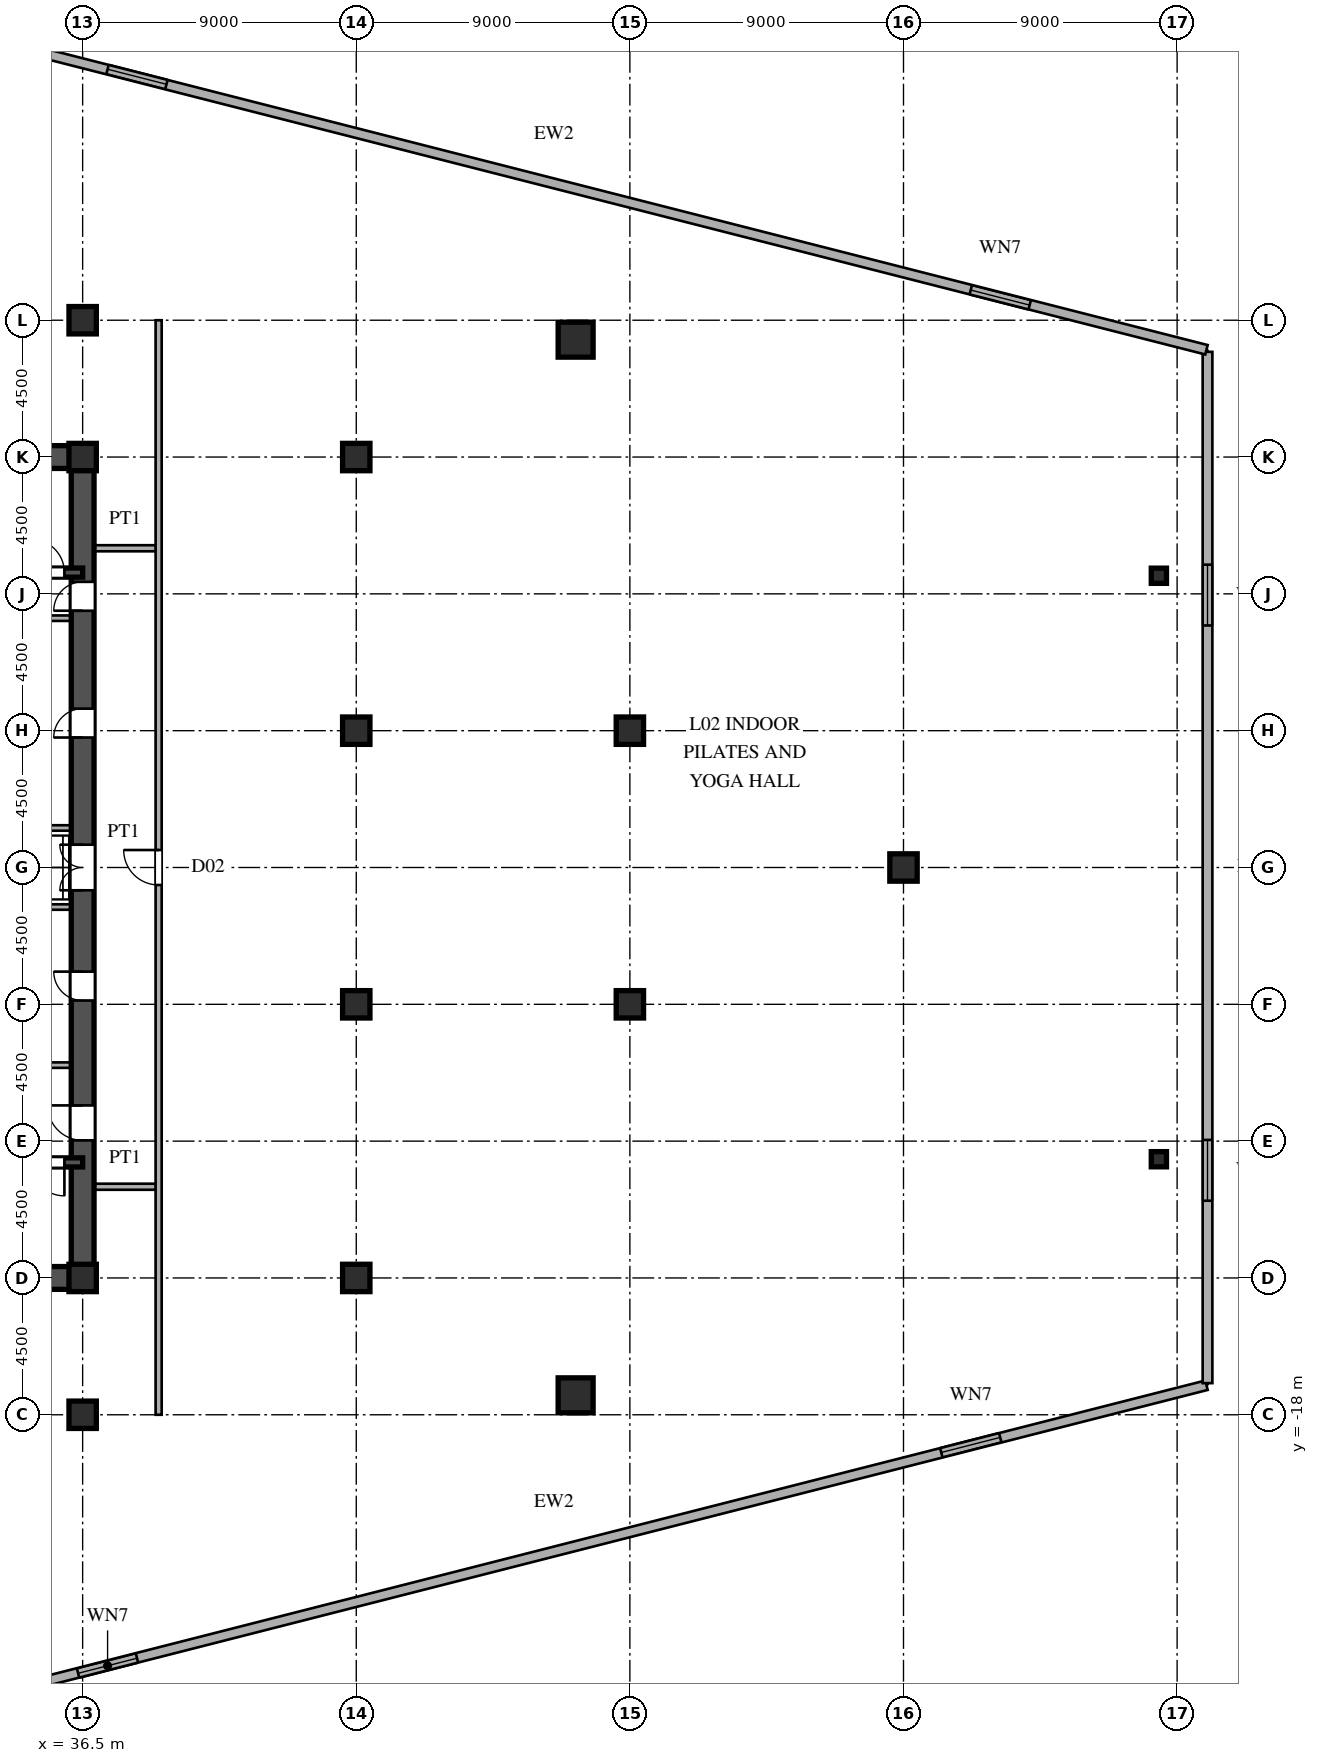
"""IFC4 building model, lengths in metres.
Left out: names, types, materials, properties, quantities, classifications, styles, units other than length and angle.
Written with IfcOpenShell. Run it as: python <this file> out.ifc"""

import sys

from ifc_helpers import new_model, si_unit, direction, frame, frame_2d, origin, origin_2d, place, context, subcontext, project, spatial, rectangle, hollow_rectangle, i_section, extrude, source, transform, mapped, element, fill, save


model = new_model("IFC4")
c1 = context("Model", 3, precision=1e-05, world=origin(), true_north=direction((0.0, 1.0)))
c2 = subcontext(c1, "Body", "Model", "MODEL_VIEW")
j1 = project(units=[si_unit("LENGTHUNIT", "METRE"), si_unit("PLANEANGLEUNIT", "RADIAN")], contexts=[c1])
p1 = place(None, origin())
s1 = spatial("IfcSite", under=j1, at=p1, CompositionType="ELEMENT")
p2 = place(p1, origin())
s2 = spatial("IfcBuilding", under=s1, at=p2, CompositionType="ELEMENT")
p3 = place(p2, frame((0.0, 0.0, 9.9)))
s3 = spatial("IfcBuildingStorey", under=s2, at=p3, CompositionType="ELEMENT", Elevation=9.9)
m1 = source(origin(), c2, "Body", "SweptSolid", [
    extrude(i_section(OverallWidth=0.9, OverallDepth=0.9, WebThickness=0.036, FlangeThickness=0.055, at=origin_2d()), origin(), (0.0, 0.0, 1.0), 4.5),
])
for number, where, z_axis, x_axis in (
    (1, (36.5, -18.0, 0.0), (0.0, 0.0, 1.0), (1.0, 0.0, 0.0)),
    (2, (36.5, -13.5, 0.0), (0.0, 0.0, 1.0), (1.0, 0.0, 0.0)),
    (3, (36.5, 13.5, 0.0), (0.0, 0.0, 1.0), (1.0, 0.0, 0.0)),
    (4, (36.5, 18.0, 0.0), (0.0, 0.0, 1.0), (1.0, 0.0, 0.0)),
    (5, (45.5, -13.5, 0.0), (0.0, 0.0, 1.0), (1.0, 0.0, 0.0)),
    (6, (45.5, -4.5, 0.0), (0.0, 0.0, 1.0), (1.0, 0.0, 0.0)),
    (7, (45.5, 4.5, 0.0), (0.0, 0.0, 1.0), (1.0, 0.0, 0.0)),
    (8, (45.5, 13.5, 0.0), (0.0, 0.0, 1.0), (1.0, 0.0, 0.0)),
    (9, (54.5, -4.5, 0.0), (0.0, 0.0, 1.0), (1.0, 0.0, 0.0)),
    (10, (54.5, 4.5, 0.0), (0.0, 0.0, 1.0), (1.0, 0.0, 0.0)),
    (11, (63.5, 0.0, 0.0), (0.0, 0.0, 1.0), (1.0, 0.0, 0.0)),
):
    element("IfcColumn", number, at=place(p3, frame(where, z_axis=z_axis, x_axis=x_axis)), inside=s3, PredefinedType="COLUMN", context=c2, shape_type="MappedRepresentation", body=[
        mapped(m1, transform((0.0, 0.0, 0.0), scale=1.0)),
    ])
m2 = source(origin(), c2, "Body", "SweptSolid", [
    extrude(hollow_rectangle(XDim=0.5, YDim=0.5, WallThickness=0.02, at=origin_2d()), origin(), (0.0, 0.0, 1.0), 4.5),
])
for number, where, z_axis, x_axis in (
    (12, (71.9, -9.596, 0.0), (0.0, 0.0, 1.0), (1.0, 0.0, 0.0)),
    (13, (71.9, 9.596, 0.0), (0.0, 0.0, 1.0), (1.0, 0.0, 0.0)),
):
    element("IfcColumn", number, at=place(p3, frame(where, z_axis=z_axis, x_axis=x_axis)), inside=s3, PredefinedType="COLUMN", context=c2, shape_type="MappedRepresentation", body=[
        mapped(m2, transform((0.0, 0.0, 0.0), scale=1.0)),
    ])
m3 = source(origin(), c2, "Body", "SweptSolid", [
    extrude(hollow_rectangle(XDim=1.15, YDim=1.15, WallThickness=0.048, at=origin_2d()), origin(), (0.0, 0.0, 1.0), 4.5),
])
for number, where, z_axis, x_axis in (
    (14, (52.716, -17.361, 0.0), (0.0, 0.0, 1.0), (1.0, 0.0, 0.0)),
    (15, (52.716, 17.361, 0.0), (0.0, 0.0, 1.0), (1.0, 0.0, 0.0)),
):
    element("IfcColumn", number, at=place(p3, frame(where, z_axis=z_axis, x_axis=x_axis)), inside=s3, PredefinedType="COLUMN", context=c2, shape_type="MappedRepresentation", body=[
        mapped(m3, transform((0.0, 0.0, 0.0), scale=1.0)),
    ])
p4 = place(p3, frame((30.539, -27.99, 0.0), z_axis=(0.0, 0.0, 1.0), x_axis=(0.968803566014, 0.247829882134, 0.0)))
e16 = element("IfcWall", 16, at=p4, inside=s3, PredefinedType="SOLIDWALL", context=c2, shape_type="SweptSolid", body=[
    extrude(rectangle(XDim=44.304, YDim=0.32, at=frame_2d((22.152, 0.0))), origin(), (0.0, 0.0, 1.0), 4.22),
])
p5 = place(p4, frame((6.0, 0.0, 0.85)))
e17 = element("IfcOpeningElement", 17, at=p5, cuts=e16, PredefinedType="OPENING", context=c2, shape_type="SweptSolid", body=[
    extrude(rectangle(XDim=2.0, YDim=1.95, at=frame_2d((1.0, 0.975))), frame((0.0, 0.17, 0.0), z_axis=(0.0, -1.0, 0.0), x_axis=(1.0, 0.0, 0.0)), (0.0, 0.0, 1.0), 0.34),
])
p6 = place(p4, frame((35.305, 0.0, 0.85)))
e18 = element("IfcOpeningElement", 18, at=p6, cuts=e16, PredefinedType="OPENING", context=c2, shape_type="SweptSolid", body=[
    extrude(rectangle(XDim=2.0, YDim=1.95, at=frame_2d((1.0, 0.975))), frame((0.0, 0.17, 0.0), z_axis=(0.0, -1.0, 0.0), x_axis=(1.0, 0.0, 0.0)), (0.0, 0.0, 1.0), 0.34),
])
p7 = place(p3, frame((73.5, -16.96, 0.0), z_axis=(0.0, 0.0, 1.0), x_axis=(0.0, 1.0, 0.0)))
e19 = element("IfcWall", 19, at=p7, inside=s3, PredefinedType="SOLIDWALL", context=c2, shape_type="SweptSolid", body=[
    extrude(rectangle(XDim=33.92, YDim=0.32, at=frame_2d((16.96, 0.0))), origin(), (0.0, 0.0, 1.0), 4.22),
])
p8 = place(p7, frame((6.0, 0.0, 0.85)))
e20 = element("IfcOpeningElement", 20, at=p8, cuts=e19, PredefinedType="OPENING", context=c2, shape_type="SweptSolid", body=[
    extrude(rectangle(XDim=2.0, YDim=1.95, at=frame_2d((1.0, 0.975))), frame((0.0, 0.17, 0.0), z_axis=(0.0, -1.0, 0.0), x_axis=(1.0, 0.0, 0.0)), (0.0, 0.0, 1.0), 0.34),
])
p9 = place(p7, frame((24.92, 0.0, 0.85)))
e21 = element("IfcOpeningElement", 21, at=p9, cuts=e19, PredefinedType="OPENING", context=c2, shape_type="SweptSolid", body=[
    extrude(rectangle(XDim=2.0, YDim=1.95, at=frame_2d((1.0, 0.975))), frame((0.0, 0.17, 0.0), z_axis=(0.0, -1.0, 0.0), x_axis=(1.0, 0.0, 0.0)), (0.0, 0.0, 1.0), 0.34),
])
p10 = place(p3, frame((73.461, 17.01, 0.0), z_axis=(0.0, 0.0, 1.0), x_axis=(-0.968803566014, 0.247829882134, 0.0)))
e22 = element("IfcWall", 22, at=p10, inside=s3, PredefinedType="SOLIDWALL", context=c2, shape_type="SweptSolid", body=[
    extrude(rectangle(XDim=44.304, YDim=0.32, at=frame_2d((22.152, 0.0))), origin(), (0.0, 0.0, 1.0), 4.22),
])
p11 = place(p10, frame((6.0, 0.0, 0.85)))
e23 = element("IfcOpeningElement", 23, at=p11, cuts=e22, PredefinedType="OPENING", context=c2, shape_type="SweptSolid", body=[
    extrude(rectangle(XDim=2.0, YDim=1.95, at=frame_2d((1.0, 0.975))), frame((0.0, 0.17, 0.0), z_axis=(0.0, -1.0, 0.0), x_axis=(1.0, 0.0, 0.0)), (0.0, 0.0, 1.0), 0.34),
])
p12 = place(p10, frame((35.305, 0.0, 0.85)))
e24 = element("IfcOpeningElement", 24, at=p12, cuts=e22, PredefinedType="OPENING", context=c2, shape_type="SweptSolid", body=[
    extrude(rectangle(XDim=2.0, YDim=1.95, at=frame_2d((1.0, 0.975))), frame((0.0, 0.17, 0.0), z_axis=(0.0, -1.0, 0.0), x_axis=(1.0, 0.0, 0.0)), (0.0, 0.0, 1.0), 0.34),
])
for number, where, z_axis, x_axis in (
    (25, (27.5, -13.5, 0.0), (0.0, 0.0, 1.0), (1.0, 0.0, 0.0)),
    (26, (27.5, 13.5, 0.0), (0.0, 0.0, 1.0), (1.0, 0.0, 0.0)),
):
    element("IfcWall", number, at=place(p3, frame(where, z_axis=z_axis, x_axis=x_axis)), inside=s3, PredefinedType="SHEAR", context=c2, shape_type="SweptSolid", body=[
        extrude(rectangle(XDim=9.0, YDim=0.75, at=frame_2d((4.5, 0.0))), origin(), (0.0, 0.0, 1.0), 4.22),
    ])
p13 = place(p3, frame((36.5, -13.65, 0.0), z_axis=(0.0, 0.0, 1.0), x_axis=(0.0, 1.0, 0.0)))
e27 = element("IfcWall", 27, at=p13, inside=s3, PredefinedType="SHEAR", context=c2, shape_type="SweptSolid", body=[
    extrude(rectangle(XDim=7.15, YDim=0.75, at=frame_2d((3.575, 0.0))), origin(), (0.0, 0.0, 1.0), 4.22),
])
p14 = place(p13, frame((4.675, 0.0, 0.0)))
e28 = element("IfcOpeningElement", 28, at=p14, cuts=e27, PredefinedType="OPENING", context=c2, shape_type="SweptSolid", body=[
    extrude(rectangle(XDim=1.15, YDim=2.2, at=frame_2d((0.575, 1.1))), frame((0.0, 0.385, 0.0), z_axis=(0.0, -1.0, 0.0), x_axis=(1.0, 0.0, 0.0)), (0.0, 0.0, 1.0), 0.77),
])
p15 = place(p3, frame((36.5, -1.3, 0.0), z_axis=(0.0, 0.0, 1.0), x_axis=(0.0, 1.0, 0.0)))
e29 = element("IfcWall", 29, at=p15, inside=s3, PredefinedType="SHEAR", context=c2, shape_type="SweptSolid", body=[
    extrude(rectangle(XDim=2.6, YDim=0.75, at=frame_2d((1.3, 0.0))), origin(), (0.0, 0.0, 1.0), 4.22),
])
p16 = place(p15, frame((0.55, 0.0, 0.0)))
e30 = element("IfcOpeningElement", 30, at=p16, cuts=e29, PredefinedType="OPENING", context=c2, shape_type="SweptSolid", body=[
    extrude(rectangle(XDim=1.5, YDim=2.3, at=frame_2d((0.75, 1.15))), frame((0.0, 0.385, 0.0), z_axis=(0.0, -1.0, 0.0), x_axis=(1.0, 0.0, 0.0)), (0.0, 0.0, 1.0), 0.77),
])
p17 = place(p3, frame((36.5, 8.2, 0.0), z_axis=(0.0, 0.0, 1.0), x_axis=(0.0, 1.0, 0.0)))
e31 = element("IfcWall", 31, at=p17, inside=s3, PredefinedType="SHEAR", context=c2, shape_type="SweptSolid", body=[
    extrude(rectangle(XDim=5.45, YDim=0.75, at=frame_2d((2.725, 0.0))), origin(), (0.0, 0.0, 1.0), 4.22),
])
p18 = place(p17, frame((0.245, 0.0, 0.0)))
e32 = element("IfcOpeningElement", 32, at=p18, cuts=e31, PredefinedType="OPENING", context=c2, shape_type="SweptSolid", body=[
    extrude(rectangle(XDim=0.95, YDim=2.15, at=frame_2d((0.475, 1.075))), frame((0.0, 0.385, 0.0), z_axis=(0.0, -1.0, 0.0), x_axis=(1.0, 0.0, 0.0)), (0.0, 0.0, 1.0), 0.77),
])
p19 = place(p3, frame((36.5, -6.5, 0.0), z_axis=(0.0, 0.0, 1.0), x_axis=(0.0, 1.0, 0.0)))
e33 = element("IfcWall", 33, at=p19, inside=s3, PredefinedType="SHEAR", context=c2, shape_type="SweptSolid", body=[
    extrude(rectangle(XDim=5.2, YDim=0.75, at=frame_2d((2.6, 0.0))), origin(), (0.0, 0.0, 1.0), 4.22),
])
p20 = place(p19, frame((2.125, 0.0, 0.0)))
e34 = element("IfcOpeningElement", 34, at=p20, cuts=e33, PredefinedType="OPENING", context=c2, shape_type="SweptSolid", body=[
    extrude(rectangle(XDim=0.95, YDim=2.15, at=frame_2d((0.475, 1.075))), frame((0.0, 0.385, 0.0), z_axis=(0.0, -1.0, 0.0), x_axis=(1.0, 0.0, 0.0)), (0.0, 0.0, 1.0), 0.77),
])
p21 = place(p3, frame((36.5, 1.3, 0.0), z_axis=(0.0, 0.0, 1.0), x_axis=(0.0, 1.0, 0.0)))
e35 = element("IfcWall", 35, at=p21, inside=s3, PredefinedType="SHEAR", context=c2, shape_type="SweptSolid", body=[
    extrude(rectangle(XDim=6.9, YDim=0.75, at=frame_2d((3.45, 0.0))), origin(), (0.0, 0.0, 1.0), 4.22),
])
p22 = place(p21, frame((2.975, 0.0, 0.0)))
e36 = element("IfcOpeningElement", 36, at=p22, cuts=e35, PredefinedType="OPENING", context=c2, shape_type="SweptSolid", body=[
    extrude(rectangle(XDim=0.95, YDim=2.15, at=frame_2d((0.475, 1.075))), frame((0.0, 0.385, 0.0), z_axis=(0.0, -1.0, 0.0), x_axis=(1.0, 0.0, 0.0)), (0.0, 0.0, 1.0), 0.77),
])
p23 = place(p3, frame((27.5, -9.7, 0.0), z_axis=(0.0, 0.0, 1.0), x_axis=(1.0, 0.0, 0.0)))
e37 = element("IfcWall", 37, at=p23, inside=s3, PredefinedType="SHEAR", context=c2, shape_type="SweptSolid", body=[
    extrude(rectangle(XDim=9.0, YDim=0.3, at=frame_2d((4.5, 0.0))), origin(), (0.0, 0.0, 1.0), 4.22),
])
p24 = place(p23, frame((7.3, 0.0, 0.0)))
e38 = element("IfcOpeningElement", 38, at=p24, cuts=e37, PredefinedType="OPENING", context=c2, shape_type="SweptSolid", body=[
    extrude(rectangle(XDim=1.1, YDim=2.2, at=frame_2d((0.55, 1.1))), frame((0.0, 0.16, 0.0), z_axis=(0.0, -1.0, 0.0), x_axis=(1.0, 0.0, 0.0)), (0.0, 0.0, 1.0), 0.32),
])
p25 = place(p3, frame((27.5, 9.7, 0.0), z_axis=(0.0, 0.0, 1.0), x_axis=(1.0, 0.0, 0.0)))
e39 = element("IfcWall", 39, at=p25, inside=s3, PredefinedType="SHEAR", context=c2, shape_type="SweptSolid", body=[
    extrude(rectangle(XDim=9.0, YDim=0.3, at=frame_2d((4.5, 0.0))), origin(), (0.0, 0.0, 1.0), 4.22),
])
p26 = place(p25, frame((7.3, 0.0, 0.0)))
e40 = element("IfcOpeningElement", 40, at=p26, cuts=e39, PredefinedType="OPENING", context=c2, shape_type="SweptSolid", body=[
    extrude(rectangle(XDim=1.1, YDim=2.2, at=frame_2d((0.55, 1.1))), frame((0.0, 0.16, 0.0), z_axis=(0.0, -1.0, 0.0), x_axis=(1.0, 0.0, 0.0)), (0.0, 0.0, 1.0), 0.32),
])
for number, where, z_axis, x_axis in (
    (41, (30.45, -6.5, 0.0), (0.0, 0.0, 1.0), (1.0, 0.0, 0.0)),
    (42, (30.45, 8.2, 0.0), (0.0, 0.0, 1.0), (1.0, 0.0, 0.0)),
):
    element("IfcWall", number, at=place(p3, frame(where, z_axis=z_axis, x_axis=x_axis)), inside=s3, PredefinedType="PARTITIONING", context=c2, shape_type="SweptSolid", body=[
        extrude(rectangle(XDim=5.7, YDim=0.18, at=frame_2d((2.85, 0.0))), origin(), (0.0, 0.0, 1.0), 4.22),
    ])
for number, where, z_axis, x_axis in (
    (43, (33.2, -1.3, 0.0), (0.0, 0.0, 1.0), (1.0, 0.0, 0.0)),
    (44, (33.2, 1.3, 0.0), (0.0, 0.0, 1.0), (1.0, 0.0, 0.0)),
):
    element("IfcWall", number, at=place(p3, frame(where, z_axis=z_axis, x_axis=x_axis)), inside=s3, PredefinedType="PARTITIONING", context=c2, shape_type="SweptSolid", body=[
        extrude(rectangle(XDim=2.95, YDim=0.18, at=frame_2d((1.475, 0.0))), origin(), (0.0, 0.0, 1.0), 4.22),
    ])
for number, where, z_axis, x_axis in (
    (45, (36.88, -10.5, 0.0), (0.0, 0.0, 1.0), (1.0, 0.0, 0.0)),
    (46, (36.88, 10.5, 0.0), (0.0, 0.0, 1.0), (1.0, 0.0, 0.0)),
):
    element("IfcWall", number, at=place(p3, frame(where, z_axis=z_axis, x_axis=x_axis)), inside=s3, PredefinedType="PARTITIONING", context=c2, shape_type="SweptSolid", body=[
        extrude(rectangle(XDim=2.035, YDim=0.2, at=frame_2d((1.018, 0.0))), origin(), (0.0, 0.0, 1.0), 4.22),
    ])
p27 = place(p3, frame((39.0, -18.0, 0.0), z_axis=(0.0, 0.0, 1.0), x_axis=(0.0, 1.0, 0.0)))
e47 = element("IfcWall", 47, at=p27, inside=s3, PredefinedType="PARTITIONING", context=c2, shape_type="SweptSolid", body=[
    extrude(rectangle(XDim=36.0, YDim=0.2, at=frame_2d((18.0, 0.0))), origin(), (0.0, 0.0, 1.0), 4.22),
])
p28 = place(p27, frame((17.425, 0.0, 0.0)))
e48 = element("IfcOpeningElement", 48, at=p28, cuts=e47, PredefinedType="OPENING", context=c2, shape_type="SweptSolid", body=[
    extrude(rectangle(XDim=1.15, YDim=2.2, at=frame_2d((0.575, 1.1))), frame((0.0, 0.11, 0.0), z_axis=(0.0, -1.0, 0.0), x_axis=(1.0, 0.0, 0.0)), (0.0, 0.0, 1.0), 0.22),
])
m4 = source(origin(), c2, "Body", "SweptSolid", [
    extrude(rectangle(XDim=2.0, YDim=1.95, at=frame_2d((1.0, 0.975))), frame((0.0, 0.03, 0.0), z_axis=(0.0, -1.0, 0.0), x_axis=(1.0, 0.0, 0.0)), (0.0, 0.0, 1.0), 0.06),
])
p29 = place(p5, origin())
e49 = element("IfcWindow", 49, at=p29, inside=s3, PartitioningType="SINGLE_PANEL", PredefinedType="WINDOW", context=c2, shape_type="MappedRepresentation", body=[
    mapped(m4, transform((0.0, 0.0, 0.0), scale=1.0)),
])
fill(e17, e49)
p30 = place(p6, origin())
e50 = element("IfcWindow", 50, at=p30, inside=s3, PartitioningType="SINGLE_PANEL", PredefinedType="WINDOW", context=c2, shape_type="MappedRepresentation", body=[
    mapped(m4, transform((0.0, 0.0, 0.0), scale=1.0)),
])
fill(e18, e50)
p31 = place(p8, origin())
e51 = element("IfcWindow", 51, at=p31, inside=s3, PartitioningType="SINGLE_PANEL", PredefinedType="WINDOW", context=c2, shape_type="MappedRepresentation", body=[
    mapped(m4, transform((0.0, 0.0, 0.0), scale=1.0)),
])
fill(e20, e51)
p32 = place(p9, origin())
e52 = element("IfcWindow", 52, at=p32, inside=s3, PartitioningType="SINGLE_PANEL", PredefinedType="WINDOW", context=c2, shape_type="MappedRepresentation", body=[
    mapped(m4, transform((0.0, 0.0, 0.0), scale=1.0)),
])
fill(e21, e52)
p33 = place(p11, origin())
e53 = element("IfcWindow", 53, at=p33, inside=s3, PartitioningType="SINGLE_PANEL", PredefinedType="WINDOW", context=c2, shape_type="MappedRepresentation", body=[
    mapped(m4, transform((0.0, 0.0, 0.0), scale=1.0)),
])
fill(e23, e53)
p34 = place(p12, origin())
e54 = element("IfcWindow", 54, at=p34, inside=s3, PartitioningType="SINGLE_PANEL", PredefinedType="WINDOW", context=c2, shape_type="MappedRepresentation", body=[
    mapped(m4, transform((0.0, 0.0, 0.0), scale=1.0)),
])
fill(e24, e54)
m5 = source(origin(), c2, "Body", "SweptSolid", [
    extrude(rectangle(XDim=1.15, YDim=2.2, at=frame_2d((0.575, 1.1))), frame((0.0, 0.025, 0.0), z_axis=(0.0, -1.0, 0.0), x_axis=(1.0, 0.0, 0.0)), (0.0, 0.0, 1.0), 0.05),
])
p35 = place(p14, origin())
e55 = element("IfcDoor", 55, at=p35, inside=s3, OperationType="SINGLE_SWING_RIGHT", PredefinedType="DOOR", context=c2, shape_type="MappedRepresentation", body=[
    mapped(m5, transform((0.0, 0.0, 0.0), scale=1.0)),
])
fill(e28, e55)
m6 = source(origin(), c2, "Body", "SweptSolid", [
    extrude(rectangle(XDim=1.5, YDim=2.3, at=frame_2d((0.75, 1.15))), frame((0.0, 0.025, 0.0), z_axis=(0.0, -1.0, 0.0), x_axis=(1.0, 0.0, 0.0)), (0.0, 0.0, 1.0), 0.05),
])
p36 = place(p16, origin())
e56 = element("IfcDoor", 56, at=p36, inside=s3, OperationType="DOUBLE_SWING_LEFT", PredefinedType="DOOR", context=c2, shape_type="MappedRepresentation", body=[
    mapped(m6, transform((0.0, 0.0, 0.0), scale=1.0)),
])
fill(e30, e56)
m7 = source(origin(), c2, "Body", "SweptSolid", [
    extrude(rectangle(XDim=0.95, YDim=2.15, at=frame_2d((0.475, 1.075))), frame((0.0, 0.025, 0.0), z_axis=(0.0, -1.0, 0.0), x_axis=(1.0, 0.0, 0.0)), (0.0, 0.0, 1.0), 0.05),
])
p37 = place(p18, origin())
e57 = element("IfcDoor", 57, at=p37, inside=s3, OperationType="SINGLE_SWING_LEFT", PredefinedType="DOOR", context=c2, shape_type="MappedRepresentation", body=[
    mapped(m7, transform((0.0, 0.0, 0.0), scale=1.0)),
])
fill(e32, e57)
p38 = place(p20, origin())
e58 = element("IfcDoor", 58, at=p38, inside=s3, OperationType="SINGLE_SWING_RIGHT", PredefinedType="DOOR", context=c2, shape_type="MappedRepresentation", body=[
    mapped(m7, transform((0.0, 0.0, 0.0), scale=1.0)),
])
fill(e34, e58)
p39 = place(p22, origin())
e59 = element("IfcDoor", 59, at=p39, inside=s3, OperationType="SINGLE_SWING_LEFT", PredefinedType="DOOR", context=c2, shape_type="MappedRepresentation", body=[
    mapped(m7, transform((0.0, 0.0, 0.0), scale=1.0)),
])
fill(e36, e59)
m8 = source(origin(), c2, "Body", "SweptSolid", [
    extrude(rectangle(XDim=1.1, YDim=2.2, at=frame_2d((0.55, 1.1))), frame((0.0, 0.025, 0.0), z_axis=(0.0, -1.0, 0.0), x_axis=(1.0, 0.0, 0.0)), (0.0, 0.0, 1.0), 0.05),
])
p40 = place(p24, frame((1.1, 0.0, 0.0), z_axis=(0.0, 0.0, 1.0), x_axis=(-1.0, 0.0, 0.0)))
e60 = element("IfcDoor", 60, at=p40, inside=s3, OperationType="SINGLE_SWING_RIGHT", PredefinedType="DOOR", context=c2, shape_type="MappedRepresentation", body=[
    mapped(m8, transform((0.0, 0.0, 0.0), scale=1.0)),
])
fill(e38, e60)
p41 = place(p26, origin())
e61 = element("IfcDoor", 61, at=p41, inside=s3, OperationType="SINGLE_SWING_LEFT", PredefinedType="DOOR", context=c2, shape_type="MappedRepresentation", body=[
    mapped(m8, transform((0.0, 0.0, 0.0), scale=1.0)),
])
fill(e40, e61)
p42 = place(p28, origin())
e62 = element("IfcDoor", 62, at=p42, inside=s3, OperationType="SINGLE_SWING_RIGHT", PredefinedType="DOOR", context=c2, shape_type="MappedRepresentation", body=[
    mapped(m5, transform((0.0, 0.0, 0.0), scale=1.0)),
])
fill(e48, e62)
save(model, sys.argv[1])
